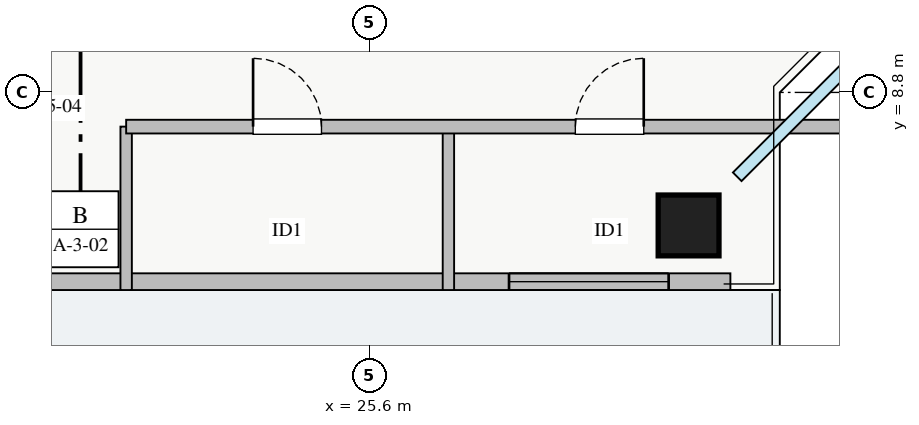
"""IFC4 building model, lengths in metres.
Left out: names, types, materials, properties, quantities, classifications, styles, units other than length and angle.
Written with IfcOpenShell. Run it as: python <this file> out.ifc"""

import sys

from ifc_helpers import new_model, si_unit, direction, frame, frame_2d, origin, origin_2d, place, context, subcontext, project, spatial, rectangle, extrude, source, transform, mapped, element, fill, save


model = new_model("IFC4")
c1 = context("Model", 3, precision=1e-05, world=origin(), true_north=direction((0.0, 1.0)))
c2 = subcontext(c1, "Body", "Model", "MODEL_VIEW")
j1 = project(units=[si_unit("LENGTHUNIT", "METRE"), si_unit("PLANEANGLEUNIT", "RADIAN")], contexts=[c1])
p1 = place(None, origin())
s1 = spatial("IfcSite", under=j1, at=p1, CompositionType="ELEMENT")
p2 = place(p1, origin())
s2 = spatial("IfcBuilding", under=s1, at=p2, CompositionType="ELEMENT")
p3 = place(p2, frame((0.0, 0.0, 190.5)))
s3 = spatial("IfcBuildingStorey", under=s2, at=p3, CompositionType="ELEMENT", Elevation=190.5)
m1 = source(origin(), c2, "Body", "SweptSolid", [
    extrude(rectangle(XDim=0.8, YDim=0.8, at=origin_2d()), origin(), (0.0, 0.0, 1.0), 3.25),
])
p4 = place(p3, frame((29.8, 7.05, 0.0), z_axis=(0.0, 0.0, 1.0), x_axis=(1.0, 0.0, 0.0)))
e1 = element("IfcColumn", 1, at=p4, inside=s3, PredefinedType="COLUMN", context=c2, shape_type="MappedRepresentation", body=[
    mapped(m1, transform((0.0, 0.0, 0.0), x_axis=(1.0, 0.0, 0.0), y_axis=(0.0, 1.0, 0.0), z_axis=(0.0, 0.0, 1.0), scale=1.0)),
])
p5 = place(p3, frame((7.65, 6.31, 0.0), z_axis=(0.0, 0.0, 1.0), x_axis=(1.0, 0.0, 0.0)))
e2 = element("IfcWall", 2, at=p5, inside=s3, PredefinedType="STANDARD", context=c2, shape_type="SweptSolid", body=[
    extrude(rectangle(XDim=22.7, YDim=0.22, at=frame_2d((11.35, 0.0))), origin(), (0.0, 0.0, 1.0), 2.61),
])
p6 = place(p5, frame((12.2, 0.0, 0.0)))
e3 = element("IfcOpeningElement", 3, at=p6, cuts=e2, PredefinedType="OPENING", context=c2, shape_type="SweptSolid", body=[
    extrude(rectangle(XDim=1.2, YDim=2.1, at=frame_2d((0.6, 1.05))), frame((0.0, 0.12, 0.0), z_axis=(0.0, -1.0, 0.0), x_axis=(1.0, 0.0, 0.0)), (0.0, 0.0, 1.0), 0.24),
])
p7 = place(p5, frame((1.637, 0.0, 0.9)))
e4 = element("IfcOpeningElement", 4, at=p7, cuts=e2, PredefinedType="OPENING", context=c2, shape_type="SweptSolid", body=[
    extrude(rectangle(XDim=2.4, YDim=1.48, at=frame_2d((1.2, 0.74))), frame((0.0, 0.12, 0.0), z_axis=(0.0, -1.0, 0.0), x_axis=(1.0, 0.0, 0.0)), (0.0, 0.0, 1.0), 0.24),
])
p8 = place(p5, frame((7.612, 0.0, 0.9)))
e5 = element("IfcOpeningElement", 5, at=p8, cuts=e2, PredefinedType="OPENING", context=c2, shape_type="SweptSolid", body=[
    extrude(rectangle(XDim=1.8, YDim=1.45, at=frame_2d((0.9, 0.725))), frame((0.0, 0.12, 0.0), z_axis=(0.0, -1.0, 0.0), x_axis=(1.0, 0.0, 0.0)), (0.0, 0.0, 1.0), 0.24),
])
p9 = place(p5, frame((19.788, 0.0, 0.9)))
e6 = element("IfcOpeningElement", 6, at=p9, cuts=e2, PredefinedType="OPENING", context=c2, shape_type="SweptSolid", body=[
    extrude(rectangle(XDim=2.1, YDim=1.5, at=frame_2d((1.05, 0.75))), frame((0.0, 0.12, 0.0), z_axis=(0.0, -1.0, 0.0), x_axis=(1.0, 0.0, 0.0)), (0.0, 0.0, 1.0), 0.24),
])
p10 = place(p3, frame((22.4, 6.2, 0.0), z_axis=(0.0, 0.0, 1.0), x_axis=(0.0, 1.0, 0.0)))
e7 = element("IfcWall", 7, at=p10, inside=s3, PredefinedType="PARTITIONING", context=c2, shape_type="SweptSolid", body=[
    extrude(rectangle(XDim=2.15, YDim=0.15, at=frame_2d((1.075, 0.0))), origin(), (0.0, 0.0, 1.0), 2.765),
])
p11 = place(p3, frame((26.64, 6.2, 0.0), z_axis=(0.0, 0.0, 1.0), x_axis=(0.0, 1.0, 0.0)))
e8 = element("IfcWall", 8, at=p11, inside=s3, PredefinedType="PARTITIONING", context=c2, shape_type="SweptSolid", body=[
    extrude(rectangle(XDim=2.15, YDim=0.15, at=frame_2d((1.075, 0.0))), origin(), (0.0, 0.0, 1.0), 3.07),
])
p12 = place(p3, frame((22.4, 8.35, 0.0), z_axis=(0.0, 0.0, 1.0), x_axis=(1.0, 0.0, 0.0)))
e9 = element("IfcWall", 9, at=p12, inside=s3, PredefinedType="PARTITIONING", context=c2, shape_type="SweptSolid", body=[
    extrude(rectangle(XDim=10.05, YDim=0.18, at=frame_2d((5.025, 0.0))), origin(), (0.0, 0.0, 1.0), 3.07),
])
p13 = place(p12, frame((1.67, 0.0, 0.0)))
e10 = element("IfcOpeningElement", 10, at=p13, cuts=e9, PredefinedType="OPENING", context=c2, shape_type="SweptSolid", body=[
    extrude(rectangle(XDim=0.9, YDim=2.05, at=frame_2d((0.45, 1.025))), frame((0.0, 0.1, 0.0), z_axis=(0.0, -1.0, 0.0), x_axis=(1.0, 0.0, 0.0)), (0.0, 0.0, 1.0), 0.2),
])
p14 = place(p12, frame((5.91, 0.0, 0.0)))
e11 = element("IfcOpeningElement", 11, at=p14, cuts=e9, PredefinedType="OPENING", context=c2, shape_type="SweptSolid", body=[
    extrude(rectangle(XDim=0.9, YDim=2.05, at=frame_2d((0.45, 1.025))), frame((0.0, 0.1, 0.0), z_axis=(0.0, -1.0, 0.0), x_axis=(1.0, 0.0, 0.0)), (0.0, 0.0, 1.0), 0.2),
])
m2 = source(origin(), c2, "Body", "SweptSolid", [
    extrude(rectangle(XDim=2.1, YDim=1.5, at=frame_2d((1.05, 0.75))), frame((0.0, 0.03, 0.0), z_axis=(0.0, -1.0, 0.0), x_axis=(1.0, 0.0, 0.0)), (0.0, 0.0, 1.0), 0.06),
])
p15 = place(p9, origin())
e12 = element("IfcWindow", 12, at=p15, inside=s3, PartitioningType="TRIPLE_PANEL_VERTICAL", PredefinedType="WINDOW", context=c2, shape_type="MappedRepresentation", body=[
    mapped(m2, transform((0.0, 0.0, 0.0), x_axis=(1.0, 0.0, 0.0), y_axis=(0.0, 1.0, 0.0), z_axis=(0.0, 0.0, 1.0), scale=1.0)),
])
fill(e6, e12)
m3 = source(origin(), c2, "Body", "SweptSolid", [
    extrude(rectangle(XDim=0.9, YDim=2.05, at=frame_2d((0.45, 1.025))), frame((0.0, 0.025, 0.0), z_axis=(0.0, -1.0, 0.0), x_axis=(1.0, 0.0, 0.0)), (0.0, 0.0, 1.0), 0.05),
])
p16 = place(p13, origin())
e13 = element("IfcDoor", 13, at=p16, inside=s3, OperationType="SINGLE_SWING_LEFT", PredefinedType="DOOR", context=c2, shape_type="MappedRepresentation", body=[
    mapped(m3, transform((0.0, 0.0, 0.0), x_axis=(1.0, 0.0, 0.0), y_axis=(0.0, 1.0, 0.0), z_axis=(0.0, 0.0, 1.0), scale=1.0)),
])
fill(e10, e13)
p17 = place(p14, origin())
e14 = element("IfcDoor", 14, at=p17, inside=s3, OperationType="SINGLE_SWING_RIGHT", PredefinedType="DOOR", context=c2, shape_type="MappedRepresentation", body=[
    mapped(m3, transform((0.0, 0.0, 0.0), x_axis=(1.0, 0.0, 0.0), y_axis=(0.0, 1.0, 0.0), z_axis=(0.0, 0.0, 1.0), scale=1.0)),
])
fill(e11, e14)
save(model, sys.argv[1])
